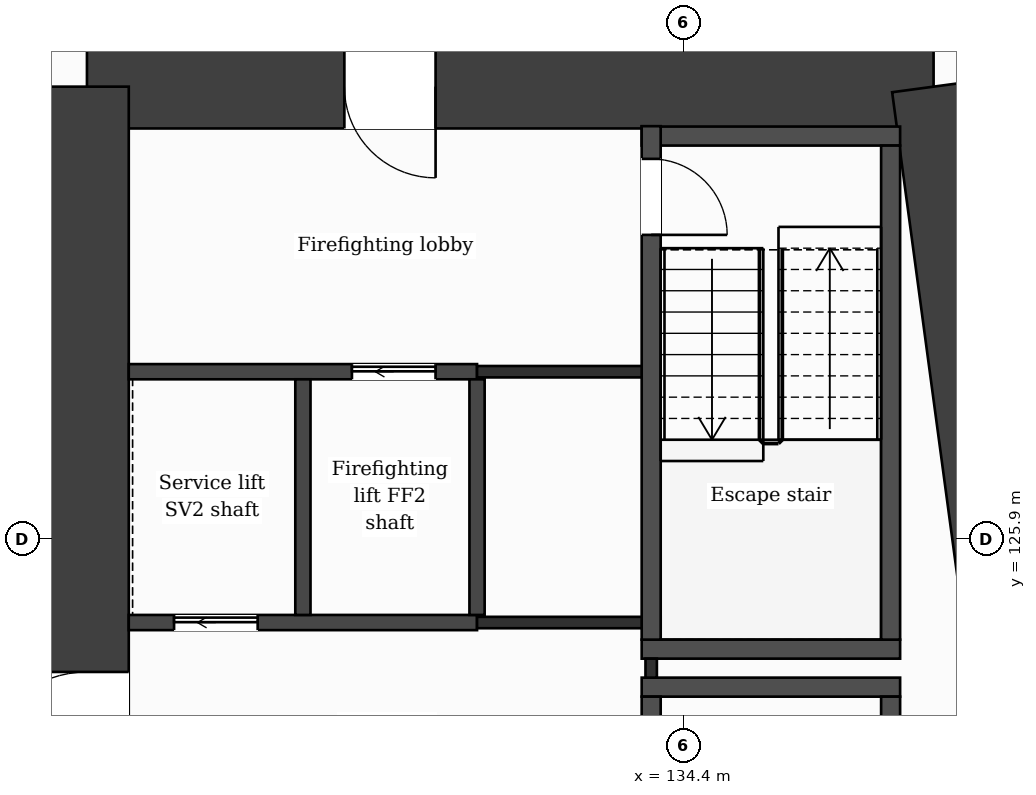
"""IFC4 building model, lengths in metres.
Left out: names, types, materials, properties, quantities, classifications, styles, units other than length and angle.
Written with IfcOpenShell. Run it as: python <this file> out.ifc"""

import sys

from ifc_helpers import new_model, si_unit, direction, frame, frame_2d, origin, place, context, subcontext, project, spatial, rectangle, extrude, element, fill, save


model = new_model("IFC4")
c1 = context("Model", 3, precision=1e-05, world=origin(), true_north=direction((0.0, 1.0)))
c2 = subcontext(c1, "Body", "Model", "MODEL_VIEW")
j1 = project(units=[si_unit("LENGTHUNIT", "METRE"), si_unit("PLANEANGLEUNIT", "RADIAN")], contexts=[c1])
p1 = place(None, origin())
s1 = spatial("IfcSite", under=j1, at=p1, CompositionType="ELEMENT")
p2 = place(p1, origin())
s2 = spatial("IfcBuilding", under=s1, at=p2, CompositionType="ELEMENT")
p3 = place(p2, frame((0.0, 0.0, 53.0)))
s3 = spatial("IfcBuildingStorey", under=s2, at=p3, CompositionType="ELEMENT", Elevation=53.0)
p4 = place(p3, frame((126.55, 131.85, 0.0), z_axis=(0.0, 0.0, 1.0), x_axis=(1.0, 0.0, 0.0)))
e1 = element("IfcWall", 1, at=p4, inside=s3, PredefinedType="SHEAR", context=c2, shape_type="SweptSolid", body=[
    extrude(rectangle(XDim=11.138, YDim=1.1, at=frame_2d((5.569, 0.0))), origin(), (0.0, 0.0, 1.0), 3.5),
])
p5 = place(p4, frame((3.386, 0.0, 0.0)))
e2 = element("IfcOpeningElement", 2, at=p5, cuts=e1, PredefinedType="OPENING", context=c2, shape_type="SweptSolid", body=[
    extrude(rectangle(XDim=1.2, YDim=2.1, at=frame_2d((0.6, 1.05))), frame((0.0, 0.56, 0.0), z_axis=(0.0, -1.0, 0.0), x_axis=(1.0, 0.0, 0.0)), (0.0, 0.0, 1.0), 1.12),
])
p6 = place(p3, frame((137.688, 131.85, 0.0), z_axis=(0.0, 0.0, 1.0), x_axis=(0.133411793472, -0.991060691059, 0.0)))
e3 = element("IfcWall", 3, at=p6, inside=s3, PredefinedType="SHEAR", context=c2, shape_type="SweptSolid", body=[
    extrude(rectangle(XDim=21.089, YDim=1.1, at=frame_2d((10.544, 0.0))), origin(), (0.0, 0.0, 1.0), 3.5),
])
p7 = place(p3, frame((126.55, 110.95, 0.0), z_axis=(0.0, 0.0, 1.0), x_axis=(0.0, 1.0, 0.0)))
e4 = element("IfcWall", 4, at=p7, inside=s3, PredefinedType="SHEAR", context=c2, shape_type="SweptSolid", body=[
    extrude(rectangle(XDim=20.9, YDim=1.1, at=frame_2d((10.45, 0.0))), origin(), (0.0, 0.0, 1.0), 3.5),
])
p8 = place(p7, frame((11.8, 0.0, 0.0)))
e5 = element("IfcOpeningElement", 5, at=p8, cuts=e4, PredefinedType="OPENING", context=c2, shape_type="SweptSolid", body=[
    extrude(rectangle(XDim=1.4, YDim=2.1, at=frame_2d((0.7, 1.05))), frame((0.0, 0.56, 0.0), z_axis=(0.0, -1.0, 0.0), x_axis=(1.0, 0.0, 0.0)), (0.0, 0.0, 1.0), 1.12),
])
for number, where, z_axis, x_axis in (
    (6, (133.848, 123.95, 0.0), (0.0, 0.0, 1.0), (1.0, 0.0, 0.0)),
    (7, (133.848, 124.45, 0.0), (0.0, 0.0, 1.0), (1.0, 0.0, 0.0)),
):
    element("IfcWall", number, at=place(p3, frame(where, z_axis=z_axis, x_axis=x_axis)), inside=s3, PredefinedType="PARTITIONING", context=c2, shape_type="SweptSolid", body=[
        extrude(rectangle(XDim=3.4, YDim=0.25, at=frame_2d((1.7, 0.0))), origin(), (0.0, 0.0, 1.0), 3.18),
    ])
p9 = place(p3, frame((127.1, 124.8, 0.0), z_axis=(0.0, 0.0, 1.0), x_axis=(1.0, 0.0, 0.0)))
e8 = element("IfcWall", 8, at=p9, inside=s3, PredefinedType="PARTITIONING", context=c2, shape_type="SweptSolid", body=[
    extrude(rectangle(XDim=4.582, YDim=0.2, at=frame_2d((2.291, 0.0))), origin(), (0.0, 0.0, 1.0), 3.18),
])
p10 = place(p9, frame((0.596, 0.0, 0.0)))
e9 = element("IfcOpeningElement", 9, at=p10, cuts=e8, PredefinedType="OPENING", context=c2, shape_type="SweptSolid", body=[
    extrude(rectangle(XDim=1.1, YDim=2.1, at=frame_2d((0.55, 1.05))), frame((0.0, 0.11, 0.0), z_axis=(0.0, -1.0, 0.0), x_axis=(1.0, 0.0, 0.0)), (0.0, 0.0, 1.0), 0.22),
])
p11 = place(p3, frame((131.682, 124.8, 0.0), z_axis=(0.0, 0.0, 1.0), x_axis=(1.0, 0.0, 0.0)))
e10 = element("IfcWall", 10, at=p11, inside=s3, PredefinedType="PARTITIONING", context=c2, shape_type="SweptSolid", body=[
    extrude(rectangle(XDim=2.416, YDim=0.15, at=frame_2d((1.208, 0.0))), origin(), (0.0, 0.0, 1.0), 3.18),
])
p12 = place(p3, frame((127.1, 128.1, 0.0), z_axis=(0.0, 0.0, 1.0), x_axis=(1.0, 0.0, 0.0)))
e11 = element("IfcWall", 11, at=p12, inside=s3, PredefinedType="PARTITIONING", context=c2, shape_type="SweptSolid", body=[
    extrude(rectangle(XDim=4.582, YDim=0.2, at=frame_2d((2.291, 0.0))), origin(), (0.0, 0.0, 1.0), 3.18),
])
p13 = place(p12, frame((2.936, 0.0, 0.0)))
e12 = element("IfcOpeningElement", 12, at=p13, cuts=e11, PredefinedType="OPENING", context=c2, shape_type="SweptSolid", body=[
    extrude(rectangle(XDim=1.1, YDim=2.1, at=frame_2d((0.55, 1.05))), frame((0.0, 0.11, 0.0), z_axis=(0.0, -1.0, 0.0), x_axis=(1.0, 0.0, 0.0)), (0.0, 0.0, 1.0), 0.22),
])
p14 = place(p3, frame((131.682, 128.1, 0.0), z_axis=(0.0, 0.0, 1.0), x_axis=(1.0, 0.0, 0.0)))
e13 = element("IfcWall", 13, at=p14, inside=s3, PredefinedType="PARTITIONING", context=c2, shape_type="SweptSolid", body=[
    extrude(rectangle(XDim=2.291, YDim=0.15, at=frame_2d((1.146, 0.0))), origin(), (0.0, 0.0, 1.0), 3.18),
])
p15 = place(p3, frame((133.848, 131.2, 0.0), z_axis=(0.0, 0.0, 1.0), x_axis=(1.0, 0.0, 0.0)))
e14 = element("IfcWall", 14, at=p15, inside=s3, PredefinedType="PARTITIONING", context=c2, shape_type="SweptSolid", body=[
    extrude(rectangle(XDim=3.4, YDim=0.25, at=frame_2d((1.7, 0.0))), origin(), (0.0, 0.0, 1.0), 3.18),
])
for number, where, z_axis, x_axis in (
    (15, (129.391, 124.9, 0.0), (0.0, 0.0, 1.0), (0.0, 1.0, 0.0)),
    (16, (131.682, 124.9, 0.0), (0.0, 0.0, 1.0), (0.0, 1.0, 0.0)),
):
    element("IfcWall", number, at=place(p3, frame(where, z_axis=z_axis, x_axis=x_axis)), inside=s3, PredefinedType="PARTITIONING", context=c2, shape_type="SweptSolid", body=[
        extrude(rectangle(XDim=3.1, YDim=0.2, at=frame_2d((1.55, 0.0))), origin(), (0.0, 0.0, 1.0), 3.18),
    ])
p16 = place(p3, frame((133.973, 124.075, 0.0), z_axis=(0.0, 0.0, 1.0), x_axis=(0.0, 1.0, 0.0)))
e17 = element("IfcWall", 17, at=p16, inside=s3, PredefinedType="PARTITIONING", context=c2, shape_type="SweptSolid", body=[
    extrude(rectangle(XDim=0.25, YDim=0.15, at=frame_2d((0.125, 0.0))), origin(), (0.0, 0.0, 1.0), 3.18),
])
p17 = place(p3, frame((133.973, 117.07, 0.0), z_axis=(0.0, 0.0, 1.0), x_axis=(0.0, 1.0, 0.0)))
e18 = element("IfcWall", 18, at=p17, inside=s3, PredefinedType="PARTITIONING", context=c2, shape_type="SweptSolid", body=[
    extrude(rectangle(XDim=6.755, YDim=0.25, at=frame_2d((3.377, 0.0))), origin(), (0.0, 0.0, 1.0), 3.18),
])
p18 = place(p17, frame((5.455, 0.0, 0.0)))
e19 = element("IfcOpeningElement", 19, at=p18, cuts=e18, PredefinedType="OPENING", context=c2, shape_type="SweptSolid", body=[
    extrude(rectangle(XDim=0.95, YDim=2.1, at=frame_2d((0.475, 1.05))), frame((0.0, 0.135, 0.0), z_axis=(0.0, -1.0, 0.0), x_axis=(1.0, 0.0, 0.0)), (0.0, 0.0, 1.0), 0.27),
])
p19 = place(p3, frame((133.973, 124.575, 0.0), z_axis=(0.0, 0.0, 1.0), x_axis=(0.0, 1.0, 0.0)))
e20 = element("IfcWall", 20, at=p19, inside=s3, PredefinedType="PARTITIONING", context=c2, shape_type="SweptSolid", body=[
    extrude(rectangle(XDim=6.755, YDim=0.25, at=frame_2d((3.377, 0.0))), origin(), (0.0, 0.0, 1.0), 3.18),
])
p20 = place(p19, frame((5.325, 0.0, 0.0)))
e21 = element("IfcOpeningElement", 21, at=p20, cuts=e20, PredefinedType="OPENING", context=c2, shape_type="SweptSolid", body=[
    extrude(rectangle(XDim=1.0, YDim=2.1, at=frame_2d((0.5, 1.05))), frame((0.0, 0.135, 0.0), z_axis=(0.0, -1.0, 0.0), x_axis=(1.0, 0.0, 0.0)), (0.0, 0.0, 1.0), 0.27),
])
p21 = place(p3, frame((137.123, 117.07, 0.0), z_axis=(0.0, 0.0, 1.0), x_axis=(0.0, 1.0, 0.0)))
e22 = element("IfcWall", 22, at=p21, inside=s3, PredefinedType="PARTITIONING", context=c2, shape_type="SweptSolid", body=[
    extrude(rectangle(XDim=6.755, YDim=0.25, at=frame_2d((3.377, 0.0))), origin(), (0.0, 0.0, 1.0), 3.18),
])
p22 = place(p3, frame((137.123, 124.575, 0.0), z_axis=(0.0, 0.0, 1.0), x_axis=(0.0, 1.0, 0.0)))
e23 = element("IfcWall", 23, at=p22, inside=s3, PredefinedType="PARTITIONING", context=c2, shape_type="SweptSolid", body=[
    extrude(rectangle(XDim=6.5, YDim=0.25, at=frame_2d((3.25, 0.0))), origin(), (0.0, 0.0, 1.0), 3.18),
])
p23 = place(p13, origin())
e24 = element("IfcDoor", 24, at=p23, inside=s3, OperationType="SLIDING_TO_LEFT", PredefinedType="DOOR", context=c2, shape_type="SweptSolid", body=[
    extrude(rectangle(XDim=1.1, YDim=2.1, at=frame_2d((0.55, 1.05))), frame((0.0, 0.025, 0.0), z_axis=(0.0, -1.0, 0.0), x_axis=(1.0, 0.0, 0.0)), (0.0, 0.0, 1.0), 0.05),
])
fill(e12, e24)
p24 = place(p10, origin())
e25 = element("IfcDoor", 25, at=p24, inside=s3, OperationType="SLIDING_TO_LEFT", PredefinedType="DOOR", context=c2, shape_type="SweptSolid", body=[
    extrude(rectangle(XDim=1.1, YDim=2.1, at=frame_2d((0.55, 1.05))), frame((0.0, 0.025, 0.0), z_axis=(0.0, -1.0, 0.0), x_axis=(1.0, 0.0, 0.0)), (0.0, 0.0, 1.0), 0.05),
])
fill(e9, e25)
p25 = place(p20, origin())
e26 = element("IfcDoor", 26, at=p25, inside=s3, OperationType="SINGLE_SWING_LEFT", PredefinedType="DOOR", context=c2, shape_type="SweptSolid", body=[
    extrude(rectangle(XDim=1.0, YDim=2.1, at=frame_2d((0.5, 1.05))), frame((0.0, 0.025, 0.0), z_axis=(0.0, -1.0, 0.0), x_axis=(1.0, 0.0, 0.0)), (0.0, 0.0, 1.0), 0.05),
])
fill(e21, e26)
p26 = place(p5, origin())
e27 = element("IfcDoor", 27, at=p26, inside=s3, OperationType="SINGLE_SWING_RIGHT", PredefinedType="DOOR", context=c2, shape_type="SweptSolid", body=[
    extrude(rectangle(XDim=1.2, YDim=2.1, at=frame_2d((0.6, 1.05))), frame((0.0, 0.025, 0.0), z_axis=(0.0, -1.0, 0.0), x_axis=(1.0, 0.0, 0.0)), (0.0, 0.0, 1.0), 0.05),
])
fill(e2, e27)
p27 = place(p8, origin())
e28 = element("IfcDoor", 28, at=p27, inside=s3, OperationType="SINGLE_SWING_LEFT", PredefinedType="DOOR", context=c2, shape_type="SweptSolid", body=[
    extrude(rectangle(XDim=1.4, YDim=2.1, at=frame_2d((0.7, 1.05))), frame((0.0, 0.025, 0.0), z_axis=(0.0, -1.0, 0.0), x_axis=(1.0, 0.0, 0.0)), (0.0, 0.0, 1.0), 0.05),
])
fill(e5, e28)
save(model, sys.argv[1])
